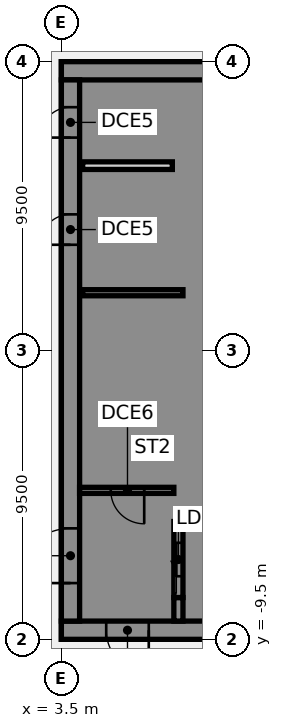
"""IFC4 building model, lengths in metres.
Left out: names, types, materials, properties, quantities, classifications, styles, units other than length and angle.
Written with IfcOpenShell. Run it as: python <this file> out.ifc"""

import sys

from ifc_helpers import new_model, si_unit, direction, frame, frame_2d, origin, place, context, subcontext, project, spatial, polyline, rectangle, outline, extrude, element, fill, save


model = new_model("IFC4")
c1 = context("Model", 3, precision=1e-05, world=origin(), true_north=direction((0.0, 1.0)))
c2 = subcontext(c1, "Body", "Model", "MODEL_VIEW")
j1 = project(units=[si_unit("LENGTHUNIT", "METRE"), si_unit("PLANEANGLEUNIT", "RADIAN")], contexts=[c1])
p1 = place(None, origin())
s1 = spatial("IfcSite", under=j1, at=p1, CompositionType="ELEMENT")
p2 = place(p1, origin())
s2 = spatial("IfcBuilding", under=s1, at=p2, CompositionType="ELEMENT")
p3 = place(p2, frame((0.0, 0.0, 121.0)))
s3 = spatial("IfcBuildingStorey", under=s2, at=p3, CompositionType="ELEMENT", Elevation=121.0)
p4 = place(p3, frame((16.5, -9.2, 0.0), z_axis=(0.0, 0.0, 1.0), x_axis=(-1.0, 0.0, 0.0)))
e1 = element("IfcWall", 1, at=p4, inside=s3, PredefinedType="SHEAR", context=c2, shape_type="SweptSolid", body=[
    extrude(rectangle(XDim=13.0, YDim=0.6, at=frame_2d((6.5, 0.0))), origin(), (0.0, 0.0, 1.0), 3.61),
])
p5 = place(p4, frame((4.15, 0.0, 0.0)))
e2 = element("IfcOpeningElement", 2, at=p5, cuts=e1, PredefinedType="OPENING", context=c2, shape_type="SweptSolid", body=[
    extrude(rectangle(XDim=1.4, YDim=2.1, at=frame_2d((0.7, 1.05))), frame((0.0, 0.31, 0.0), z_axis=(0.0, -1.0, 0.0), x_axis=(1.0, 0.0, 0.0)), (0.0, 0.0, 1.0), 0.62),
])
p6 = place(p4, frame((10.125, 0.0, 0.0)))
e3 = element("IfcOpeningElement", 3, at=p6, cuts=e1, PredefinedType="OPENING", context=c2, shape_type="SweptSolid", body=[
    extrude(rectangle(XDim=1.4, YDim=2.1, at=frame_2d((0.7, 1.05))), frame((0.0, 0.31, 0.0), z_axis=(0.0, -1.0, 0.0), x_axis=(1.0, 0.0, 0.0)), (0.0, 0.0, 1.0), 0.62),
])
p7 = place(p3, frame((16.5, 9.2, 0.0), z_axis=(0.0, 0.0, 1.0), x_axis=(-1.0, 0.0, 0.0)))
e4 = element("IfcWall", 4, at=p7, inside=s3, PredefinedType="SHEAR", context=c2, shape_type="SweptSolid", body=[
    extrude(rectangle(XDim=13.0, YDim=0.6, at=frame_2d((6.5, 0.0))), origin(), (0.0, 0.0, 1.0), 3.61),
])
p8 = place(p3, origin())
e5 = element("IfcWall", 5, at=p8, inside=s3, PredefinedType="SHEAR", context=c2, shape_type="SweptSolid", body=[
    extrude(outline(polyline([(9.8, -5.375), (7.5, -5.375), (7.5, -2.875), (9.8, -2.875), (9.8, -2.625), (7.5, -2.625), (7.5, -0.125), (9.8, -0.125), (9.8, 0.125), (7.5, 0.125), (7.5, 2.625), (9.8, 2.625), (9.8, 2.875), (7.5, 2.875), (7.5, 5.375), (9.8, 5.375), (9.8, 5.625), (7.5, 5.625), (7.5, 8.125), (9.8, 8.125), (9.8, 8.9), (7.5, 8.9), (7.2, 8.9), (7.2, -5.625), (7.5, -5.625), (9.8, -5.625), (9.8, -5.375)])), origin(), (0.0, 0.0, 1.0), 3.61),
])
p9 = place(p3, origin())
e6 = element("IfcWall", 6, at=p9, inside=s3, PredefinedType="SHEAR", context=c2, shape_type="SweptSolid", body=[
    extrude(outline(polyline([(7.5, -8.125), (7.5, -8.9), (9.8, -8.9), (9.8, -8.125), (9.8, -5.625), (9.55, -5.625), (9.55, -8.125), (7.5, -8.125)])), origin(), (0.0, 0.0, 1.0), 3.61),
])
p10 = place(p3, frame((7.35, -8.9, 0.0), z_axis=(0.0, 0.0, 1.0), x_axis=(0.0, 1.0, 0.0)))
e7 = element("IfcWall", 7, at=p10, inside=s3, PredefinedType="SHEAR", context=c2, shape_type="SweptSolid", body=[
    extrude(rectangle(XDim=0.775, YDim=0.3, at=frame_2d((0.387, 0.0))), origin(), (0.0, 0.0, 1.0), 3.61),
])
p11 = place(p3, frame((7.5, 1.9, 0.0), z_axis=(0.0, 0.0, 1.0), x_axis=(-1.0, 0.0, 0.0)))
e8 = element("IfcWall", 8, at=p11, inside=s3, PredefinedType="SHEAR", context=c2, shape_type="SweptSolid", body=[
    extrude(rectangle(XDim=3.3, YDim=0.2, at=frame_2d((1.65, 0.0))), origin(), (0.0, 0.0, 1.0), 3.61),
])
p12 = place(p3, frame((7.35, -8.125, 0.0), z_axis=(0.0, 0.0, 1.0), x_axis=(0.0, 1.0, 0.0)))
e9 = element("IfcWall", 9, at=p12, inside=s3, PredefinedType="SHEAR", context=c2, shape_type="SweptSolid", body=[
    extrude(rectangle(XDim=2.5, YDim=0.3, at=frame_2d((1.25, 0.0))), origin(), (0.0, 0.0, 1.0), 3.61),
])
p13 = place(p12, frame((0.7, 0.0, 0.0)))
e10 = element("IfcOpeningElement", 10, at=p13, cuts=e9, PredefinedType="OPENING", context=c2, shape_type="SweptSolid", body=[
    extrude(rectangle(XDim=1.1, YDim=2.1, at=frame_2d((0.55, 1.05))), frame((0.0, 0.16, 0.0), z_axis=(0.0, -1.0, 0.0), x_axis=(1.0, 0.0, 0.0)), (0.0, 0.0, 1.0), 0.32),
])
p14 = place(p3, frame((3.8, -8.9, 0.0), z_axis=(0.0, 0.0, 1.0), x_axis=(0.0, 1.0, 0.0)))
e11 = element("IfcWall", 11, at=p14, inside=s3, PredefinedType="SHEAR", context=c2, shape_type="SweptSolid", body=[
    extrude(rectangle(XDim=17.8, YDim=0.6, at=frame_2d((8.9, 0.0))), origin(), (0.0, 0.0, 1.0), 3.61),
])
p15 = place(p14, frame((1.25, 0.0, 0.0)))
e12 = element("IfcOpeningElement", 12, at=p15, cuts=e11, PredefinedType="OPENING", context=c2, shape_type="SweptSolid", body=[
    extrude(rectangle(XDim=1.8, YDim=2.1, at=frame_2d((0.9, 1.05))), frame((0.0, 0.31, 0.0), z_axis=(0.0, -1.0, 0.0), x_axis=(1.0, 0.0, 0.0)), (0.0, 0.0, 1.0), 0.62),
])
p16 = place(p14, frame((12.377, 0.0, 0.0)))
e13 = element("IfcOpeningElement", 13, at=p16, cuts=e11, PredefinedType="OPENING", context=c2, shape_type="SweptSolid", body=[
    extrude(rectangle(XDim=1.0, YDim=2.1, at=frame_2d((0.5, 1.05))), frame((0.0, 0.31, 0.0), z_axis=(0.0, -1.0, 0.0), x_axis=(1.0, 0.0, 0.0)), (0.0, 0.0, 1.0), 0.62),
])
p17 = place(p14, frame((15.903, 0.0, 0.0)))
e14 = element("IfcOpeningElement", 14, at=p17, cuts=e11, PredefinedType="OPENING", context=c2, shape_type="SweptSolid", body=[
    extrude(rectangle(XDim=1.0, YDim=2.1, at=frame_2d((0.5, 1.05))), frame((0.0, 0.31, 0.0), z_axis=(0.0, -1.0, 0.0), x_axis=(1.0, 0.0, 0.0)), (0.0, 0.0, 1.0), 0.62),
])
p18 = place(p3, frame((7.15, 6.08, 0.0), z_axis=(0.0, 0.0, 1.0), x_axis=(-1.0, 0.0, 0.0)))
e15 = element("IfcWall", 15, at=p18, inside=s3, PredefinedType="PARTITIONING", context=c2, shape_type="SweptSolid", body=[
    extrude(rectangle(XDim=2.95, YDim=0.25, at=frame_2d((1.475, 0.0))), origin(), (0.0, 0.0, 1.0), 3.61),
])
p19 = place(p3, frame((7.2, -4.6, 0.0), z_axis=(0.0, 0.0, 1.0), x_axis=(-1.0, 0.0, 0.0)))
e16 = element("IfcWall", 16, at=p19, inside=s3, PredefinedType="SHEAR", context=c2, shape_type="SweptSolid", body=[
    extrude(rectangle(XDim=3.1, YDim=0.2, at=frame_2d((1.55, 0.0))), origin(), (0.0, 0.0, 1.0), 3.61),
])
p20 = place(p19, frame((0.975, 0.0, 0.0)))
e17 = element("IfcOpeningElement", 17, at=p20, cuts=e16, PredefinedType="OPENING", context=c2, shape_type="SweptSolid", body=[
    extrude(rectangle(XDim=1.1, YDim=2.1, at=frame_2d((0.55, 1.05))), frame((0.0, 0.11, 0.0), z_axis=(0.0, -1.0, 0.0), x_axis=(1.0, 0.0, 0.0)), (0.0, 0.0, 1.0), 0.22),
])
p21 = place(p6, origin())
e18 = element("IfcDoor", 18, at=p21, inside=s3, OperationType="SINGLE_SWING_LEFT", PredefinedType="DOOR", context=c2, shape_type="SweptSolid", body=[
    extrude(rectangle(XDim=1.4, YDim=2.1, at=frame_2d((0.7, 1.05))), frame((0.0, 0.025, 0.0), z_axis=(0.0, -1.0, 0.0), x_axis=(1.0, 0.0, 0.0)), (0.0, 0.0, 1.0), 0.05),
])
fill(e3, e18)
p22 = place(p15, origin())
e19 = element("IfcDoor", 19, at=p22, inside=s3, OperationType="SINGLE_SWING_LEFT", PredefinedType="DOOR", context=c2, shape_type="SweptSolid", body=[
    extrude(rectangle(XDim=1.8, YDim=2.1, at=frame_2d((0.9, 1.05))), frame((0.0, 0.025, 0.0), z_axis=(0.0, -1.0, 0.0), x_axis=(1.0, 0.0, 0.0)), (0.0, 0.0, 1.0), 0.05),
])
fill(e12, e19)
p23 = place(p16, origin())
e20 = element("IfcDoor", 20, at=p23, inside=s3, OperationType="SINGLE_SWING_LEFT", PredefinedType="DOOR", context=c2, shape_type="SweptSolid", body=[
    extrude(rectangle(XDim=1.0, YDim=2.1, at=frame_2d((0.5, 1.05))), frame((0.0, -0.225, 0.0), z_axis=(0.0, -1.0, 0.0), x_axis=(1.0, 0.0, 0.0)), (0.0, 0.0, 1.0), 0.05),
])
fill(e13, e20)
p24 = place(p17, origin())
e21 = element("IfcDoor", 21, at=p24, inside=s3, OperationType="SINGLE_SWING_LEFT", PredefinedType="DOOR", context=c2, shape_type="SweptSolid", body=[
    extrude(rectangle(XDim=1.0, YDim=2.1, at=frame_2d((0.5, 1.05))), frame((0.0, -0.225, 0.0), z_axis=(0.0, -1.0, 0.0), x_axis=(1.0, 0.0, 0.0)), (0.0, 0.0, 1.0), 0.05),
])
fill(e14, e21)
p25 = place(p20, origin())
e22 = element("IfcDoor", 22, at=p25, inside=s3, OperationType="SINGLE_SWING_LEFT", PredefinedType="DOOR", context=c2, shape_type="SweptSolid", body=[
    extrude(rectangle(XDim=1.1, YDim=2.1, at=frame_2d((0.55, 1.05))), frame((0.0, 0.025, 0.0), z_axis=(0.0, -1.0, 0.0), x_axis=(1.0, 0.0, 0.0)), (0.0, 0.0, 1.0), 0.05),
])
fill(e17, e22)
p26 = place(p13, origin())
e23 = element("IfcDoor", 23, at=p26, inside=s3, OperationType="SLIDING_TO_LEFT", PredefinedType="DOOR", context=c2, shape_type="SweptSolid", body=[
    extrude(rectangle(XDim=1.1, YDim=2.1, at=frame_2d((0.55, 1.05))), frame((0.0, 0.025, 0.0), z_axis=(0.0, -1.0, 0.0), x_axis=(1.0, 0.0, 0.0)), (0.0, 0.0, 1.0), 0.05),
])
fill(e10, e23)
save(model, sys.argv[1])
